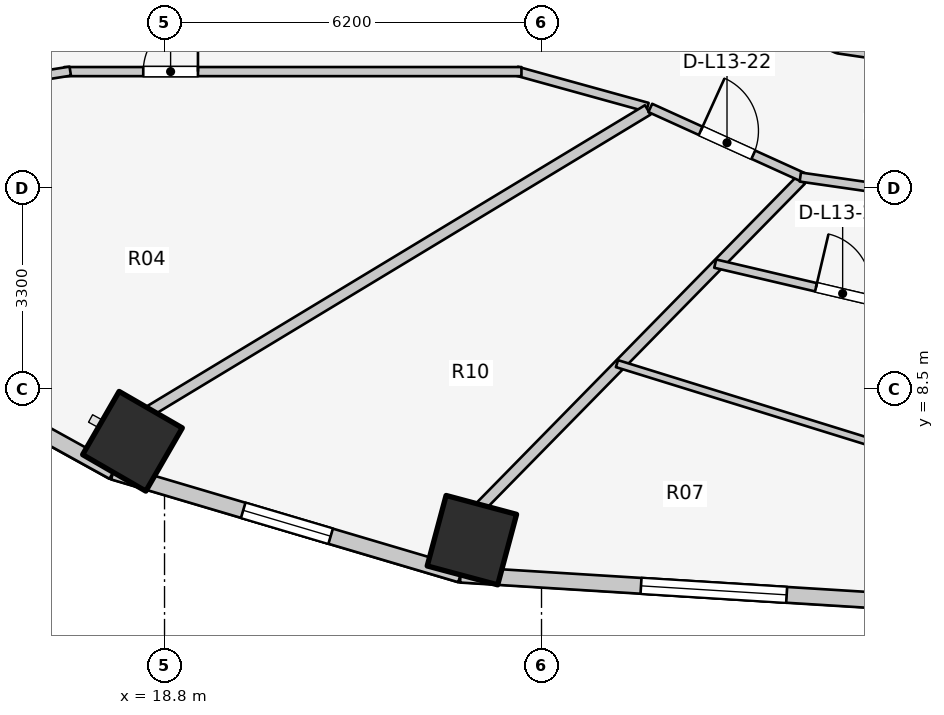
"""IFC4 building model, lengths in metres.
Left out: names, types, materials, properties, quantities, classifications, styles, units other than length and angle.
Written with IfcOpenShell. Run it as: python <this file> out.ifc"""

import sys

from ifc_helpers import new_model, si_unit, direction, frame, frame_2d, origin, origin_2d, place, context, subcontext, project, spatial, rectangle, extrude, element, fill, save


model = new_model("IFC4")
c1 = context("Model", 3, precision=1e-05, world=origin(), true_north=direction((0.0, 1.0)))
c2 = subcontext(c1, "Body", "Model", "MODEL_VIEW")
j1 = project(units=[si_unit("LENGTHUNIT", "METRE"), si_unit("PLANEANGLEUNIT", "RADIAN")], contexts=[c1])
p1 = place(None, origin())
s1 = spatial("IfcSite", under=j1, at=p1, CompositionType="ELEMENT")
p2 = place(p1, origin())
s2 = spatial("IfcBuilding", under=s1, at=p2, CompositionType="ELEMENT")
p3 = place(p2, frame((0.0, 0.0, 46.2)))
s3 = spatial("IfcBuildingStorey", under=s2, at=p3, CompositionType="ELEMENT", Elevation=46.2)
for number, where, z_axis, x_axis in (
    (1, (18.273, 7.641, 0.0), (0.0, 0.0, 1.0), (-0.5, -0.866, 0.0)),
    (2, (23.855, 6.014, 0.0), (0.0, 0.0, 1.0), (-0.259, -0.966, 0.0)),
):
    element("IfcColumn", number, at=place(p3, frame(where, z_axis=z_axis, x_axis=x_axis)), inside=s3, PredefinedType="COLUMN", context=c2, shape_type="SweptSolid", body=[
        extrude(rectangle(XDim=1.2, YDim=1.2, at=origin_2d()), origin(), (0.0, 0.0, 1.0), 3.1),
    ])
p4 = place(p3, frame((13.595, 9.55, 0.0), z_axis=(0.0, 0.0, 1.0), x_axis=(0.875137303239, -0.483874674352, 0.0)))
e3 = element("IfcWall", 3, at=p4, inside=s3, PredefinedType="STANDARD", context=c2, shape_type="SweptSolid", body=[
    extrude(rectangle(XDim=4.985, YDim=0.26, at=frame_2d((2.493, 0.0))), origin(), (0.0, 0.0, 1.0), 2.85),
])
p5 = place(p3, frame((17.958, 7.138, 0.0), z_axis=(0.0, 0.0, 1.0), x_axis=(0.958843593522, -0.283934786811, 0.0)))
e4 = element("IfcWall", 4, at=p5, inside=s3, PredefinedType="STANDARD", context=c2, shape_type="SweptSolid", body=[
    extrude(rectangle(XDim=5.955, YDim=0.26, at=frame_2d((2.978, 0.0))), origin(), (0.0, 0.0, 1.0), 2.85),
])
p6 = place(p5, frame((2.228, 0.0, 0.75)))
e5 = element("IfcOpeningElement", 5, at=p6, cuts=e4, PredefinedType="OPENING", context=c2, shape_type="SweptSolid", body=[
    extrude(rectangle(XDim=1.5, YDim=1.6, at=frame_2d((0.75, 0.8))), frame((0.0, 0.14, 0.0), z_axis=(0.0, -1.0, 0.0), x_axis=(1.0, 0.0, 0.0)), (0.0, 0.0, 1.0), 0.28),
])
p7 = place(p3, frame((23.668, 5.447, 0.0), z_axis=(0.0, 0.0, 1.0), x_axis=(0.998090514779, -0.061768311519, 0.0)))
e6 = element("IfcWall", 6, at=p7, inside=s3, PredefinedType="STANDARD", context=c2, shape_type="SweptSolid", body=[
    extrude(rectangle(XDim=8.348, YDim=0.26, at=frame_2d((4.174, 0.0))), origin(), (0.0, 0.0, 1.0), 2.85),
])
p8 = place(p7, frame((2.974, 0.0, 0.75)))
e7 = element("IfcOpeningElement", 7, at=p8, cuts=e6, PredefinedType="OPENING", context=c2, shape_type="SweptSolid", body=[
    extrude(rectangle(XDim=2.4, YDim=1.7, at=frame_2d((1.2, 0.85))), frame((0.0, 0.14, 0.0), z_axis=(0.0, -1.0, 0.0), x_axis=(1.0, 0.0, 0.0)), (0.0, 0.0, 1.0), 0.28),
])
p9 = place(p3, frame((27.89, 15.015, 0.0), z_axis=(0.0, 0.0, 1.0), x_axis=(0.906943449489, -0.421252393975, 0.0)))
e8 = element("IfcWall", 8, at=p9, inside=s3, PredefinedType="PARTITIONING", context=c2, shape_type="SweptSolid", body=[
    extrude(rectangle(XDim=2.186, YDim=0.15, at=frame_2d((1.093, 0.0))), origin(), (0.0, 0.0, 1.0), 2.237),
])
p10 = place(p3, frame((29.873, 14.094, 0.0), z_axis=(0.0, 0.0, 1.0), x_axis=(0.989268584896, -0.146108408166, 0.0)))
e9 = element("IfcWall", 9, at=p10, inside=s3, PredefinedType="PARTITIONING", context=c2, shape_type="SweptSolid", body=[
    extrude(rectangle(XDim=2.151, YDim=0.15, at=frame_2d((1.075, 0.0))), origin(), (0.0, 0.0, 1.0), 2.237),
])
p11 = place(p3, frame((26.742, 13.133, 0.0), z_axis=(0.0, 0.0, 1.0), x_axis=(-0.963833843713, 0.266503886865, 0.0)))
e10 = element("IfcWall", 10, at=p11, inside=s3, PredefinedType="PARTITIONING", context=c2, shape_type="SweptSolid", body=[
    extrude(rectangle(XDim=2.232, YDim=0.15, at=frame_2d((1.116, 0.0))), origin(), (0.0, 0.0, 1.0), 2.237),
])
p12 = place(p3, frame((17.15, 13.72, 0.0), z_axis=(0.0, 0.0, 1.0), x_axis=(1.0, 0.0, 0.0)))
e11 = element("IfcWall", 11, at=p12, inside=s3, PredefinedType="PARTITIONING", context=c2, shape_type="SweptSolid", body=[
    extrude(rectangle(XDim=7.52, YDim=0.15, at=frame_2d((3.76, 0.0))), origin(), (0.0, 0.0, 1.0), 2.237),
])
p13 = place(p12, frame((1.3, 0.0, 0.0)))
e12 = element("IfcOpeningElement", 12, at=p13, cuts=e11, PredefinedType="OPENING", context=c2, shape_type="SweptSolid", body=[
    extrude(rectangle(XDim=0.9, YDim=2.1, at=frame_2d((0.45, 1.05))), frame((0.0, 0.085, 0.0), z_axis=(0.0, -1.0, 0.0), x_axis=(1.0, 0.0, 0.0)), (0.0, 0.0, 1.0), 0.17),
])
p14 = place(p3, frame((17.25, 13.728, 0.0), z_axis=(0.0, 0.0, 1.0), x_axis=(-0.987655781226, -0.156639898525, 0.0)))
e13 = element("IfcWall", 13, at=p14, inside=s3, PredefinedType="PARTITIONING", context=c2, shape_type="SweptSolid", body=[
    extrude(rectangle(XDim=7.552, YDim=0.15, at=frame_2d((3.776, 0.0))), origin(), (0.0, 0.0, 1.0), 2.069),
])
p15 = place(p3, frame((26.748, 13.09, 0.0), z_axis=(0.0, 0.0, 1.0), x_axis=(-0.855817136021, -0.517278483694, 0.0)))
e14 = element("IfcWall", 14, at=p15, inside=s3, PredefinedType="PARTITIONING", context=c2, shape_type="SweptSolid", body=[
    extrude(rectangle(XDim=9.564, YDim=0.18, at=frame_2d((4.782, 0.0))), origin(), (0.0, 0.0, 1.0), 2.237),
])
p16 = place(p3, frame((29.267, 11.939, 0.0), z_axis=(0.0, 0.0, 1.0), x_axis=(-0.700234780085, -0.713912636644, 0.0)))
e15 = element("IfcWall", 15, at=p16, inside=s3, PredefinedType="PARTITIONING", context=c2, shape_type="SweptSolid", body=[
    extrude(rectangle(XDim=7.515, YDim=0.18, at=frame_2d((3.757, 0.0))), origin(), (0.0, 0.0, 1.0), 2.237),
])
p17 = place(p3, frame((26.789, 13.123, 0.0), z_axis=(0.0, 0.0, 1.0), x_axis=(0.910568469686, -0.41335827319, 0.0)))
e16 = element("IfcWall", 16, at=p17, inside=s3, PredefinedType="PARTITIONING", context=c2, shape_type="SweptSolid", body=[
    extrude(rectangle(XDim=2.772, YDim=0.15, at=frame_2d((1.386, 0.0))), origin(), (0.0, 0.0, 1.0), 2.237),
])
p18 = place(p17, frame((0.911, 0.0, 0.0)))
e17 = element("IfcOpeningElement", 17, at=p18, cuts=e16, PredefinedType="OPENING", context=c2, shape_type="SweptSolid", body=[
    extrude(rectangle(XDim=0.95, YDim=2.1, at=frame_2d((0.475, 1.05))), frame((0.0, 0.085, 0.0), z_axis=(0.0, -1.0, 0.0), x_axis=(1.0, 0.0, 0.0)), (0.0, 0.0, 1.0), 0.17),
])
p19 = place(p3, frame((26.241, 8.917, 0.0), z_axis=(0.0, 0.0, 1.0), x_axis=(0.955191504197, -0.29598849692, 0.0)))
e18 = element("IfcWall", 18, at=p19, inside=s3, PredefinedType="MOVABLE", context=c2, shape_type="SweptSolid", body=[
    extrude(rectangle(XDim=6.039, YDim=0.12, at=frame_2d((3.02, 0.0))), origin(), (0.0, 0.0, 1.0), 2.237),
])
p20 = place(p3, frame((29.256, 11.986, 0.0), z_axis=(0.0, 0.0, 1.0), x_axis=(0.989761784218, -0.142729150844, 0.0)))
e19 = element("IfcWall", 19, at=p20, inside=s3, PredefinedType="PARTITIONING", context=c2, shape_type="SweptSolid", body=[
    extrude(rectangle(XDim=2.822, YDim=0.15, at=frame_2d((1.411, 0.0))), origin(), (0.0, 0.0, 1.0), 2.237),
])
p21 = place(p3, frame((27.856, 10.562, 0.0), z_axis=(0.0, 0.0, 1.0), x_axis=(0.973546394015, -0.228489427982, 0.0)))
e20 = element("IfcWall", 20, at=p21, inside=s3, PredefinedType="PLUMBINGWALL", context=c2, shape_type="SweptSolid", body=[
    extrude(rectangle(XDim=4.306, YDim=0.14, at=frame_2d((2.153, 0.0))), origin(), (0.0, 0.0, 1.0), 2.237),
])
p22 = place(p21, frame((1.703, 0.0, 0.0)))
e21 = element("IfcOpeningElement", 21, at=p22, cuts=e20, PredefinedType="OPENING", context=c2, shape_type="SweptSolid", body=[
    extrude(rectangle(XDim=0.9, YDim=2.1, at=frame_2d((0.45, 1.05))), frame((0.0, 0.08, 0.0), z_axis=(0.0, -1.0, 0.0), x_axis=(1.0, 0.0, 0.0)), (0.0, 0.0, 1.0), 0.16),
])
p23 = place(p6, origin())
e22 = element("IfcWindow", 22, at=p23, inside=s3, PartitioningType="SINGLE_PANEL", PredefinedType="WINDOW", context=c2, shape_type="SweptSolid", body=[
    extrude(rectangle(XDim=1.5, YDim=1.6, at=frame_2d((0.75, 0.8))), frame((0.0, 0.03, 0.0), z_axis=(0.0, -1.0, 0.0), x_axis=(1.0, 0.0, 0.0)), (0.0, 0.0, 1.0), 0.06),
])
fill(e5, e22)
p24 = place(p8, origin())
e23 = element("IfcWindow", 23, at=p24, inside=s3, PartitioningType="SINGLE_PANEL", PredefinedType="WINDOW", context=c2, shape_type="SweptSolid", body=[
    extrude(rectangle(XDim=2.4, YDim=1.7, at=frame_2d((1.2, 0.85))), frame((0.0, 0.03, 0.0), z_axis=(0.0, -1.0, 0.0), x_axis=(1.0, 0.0, 0.0)), (0.0, 0.0, 1.0), 0.06),
])
fill(e7, e23)
p25 = place(p13, origin())
e24 = element("IfcDoor", 24, at=p25, inside=s3, OperationType="SINGLE_SWING_RIGHT", PredefinedType="DOOR", context=c2, shape_type="SweptSolid", body=[
    extrude(rectangle(XDim=0.9, YDim=2.1, at=frame_2d((0.45, 1.05))), frame((0.0, 0.025, 0.0), z_axis=(0.0, -1.0, 0.0), x_axis=(1.0, 0.0, 0.0)), (0.0, 0.0, 1.0), 0.05),
])
fill(e12, e24)
p26 = place(p18, origin())
e25 = element("IfcDoor", 25, at=p26, inside=s3, OperationType="SINGLE_SWING_LEFT", PredefinedType="DOOR", context=c2, shape_type="SweptSolid", body=[
    extrude(rectangle(XDim=0.95, YDim=2.1, at=frame_2d((0.475, 1.05))), frame((0.0, 0.025, 0.0), z_axis=(0.0, -1.0, 0.0), x_axis=(1.0, 0.0, 0.0)), (0.0, 0.0, 1.0), 0.05),
])
fill(e17, e25)
p27 = place(p22, origin())
e26 = element("IfcDoor", 26, at=p27, inside=s3, OperationType="SINGLE_SWING_LEFT", PredefinedType="DOOR", context=c2, shape_type="SweptSolid", body=[
    extrude(rectangle(XDim=0.9, YDim=2.1, at=frame_2d((0.45, 1.05))), frame((0.0, 0.025, 0.0), z_axis=(0.0, -1.0, 0.0), x_axis=(1.0, 0.0, 0.0)), (0.0, 0.0, 1.0), 0.05),
])
fill(e21, e26)
save(model, sys.argv[1])
